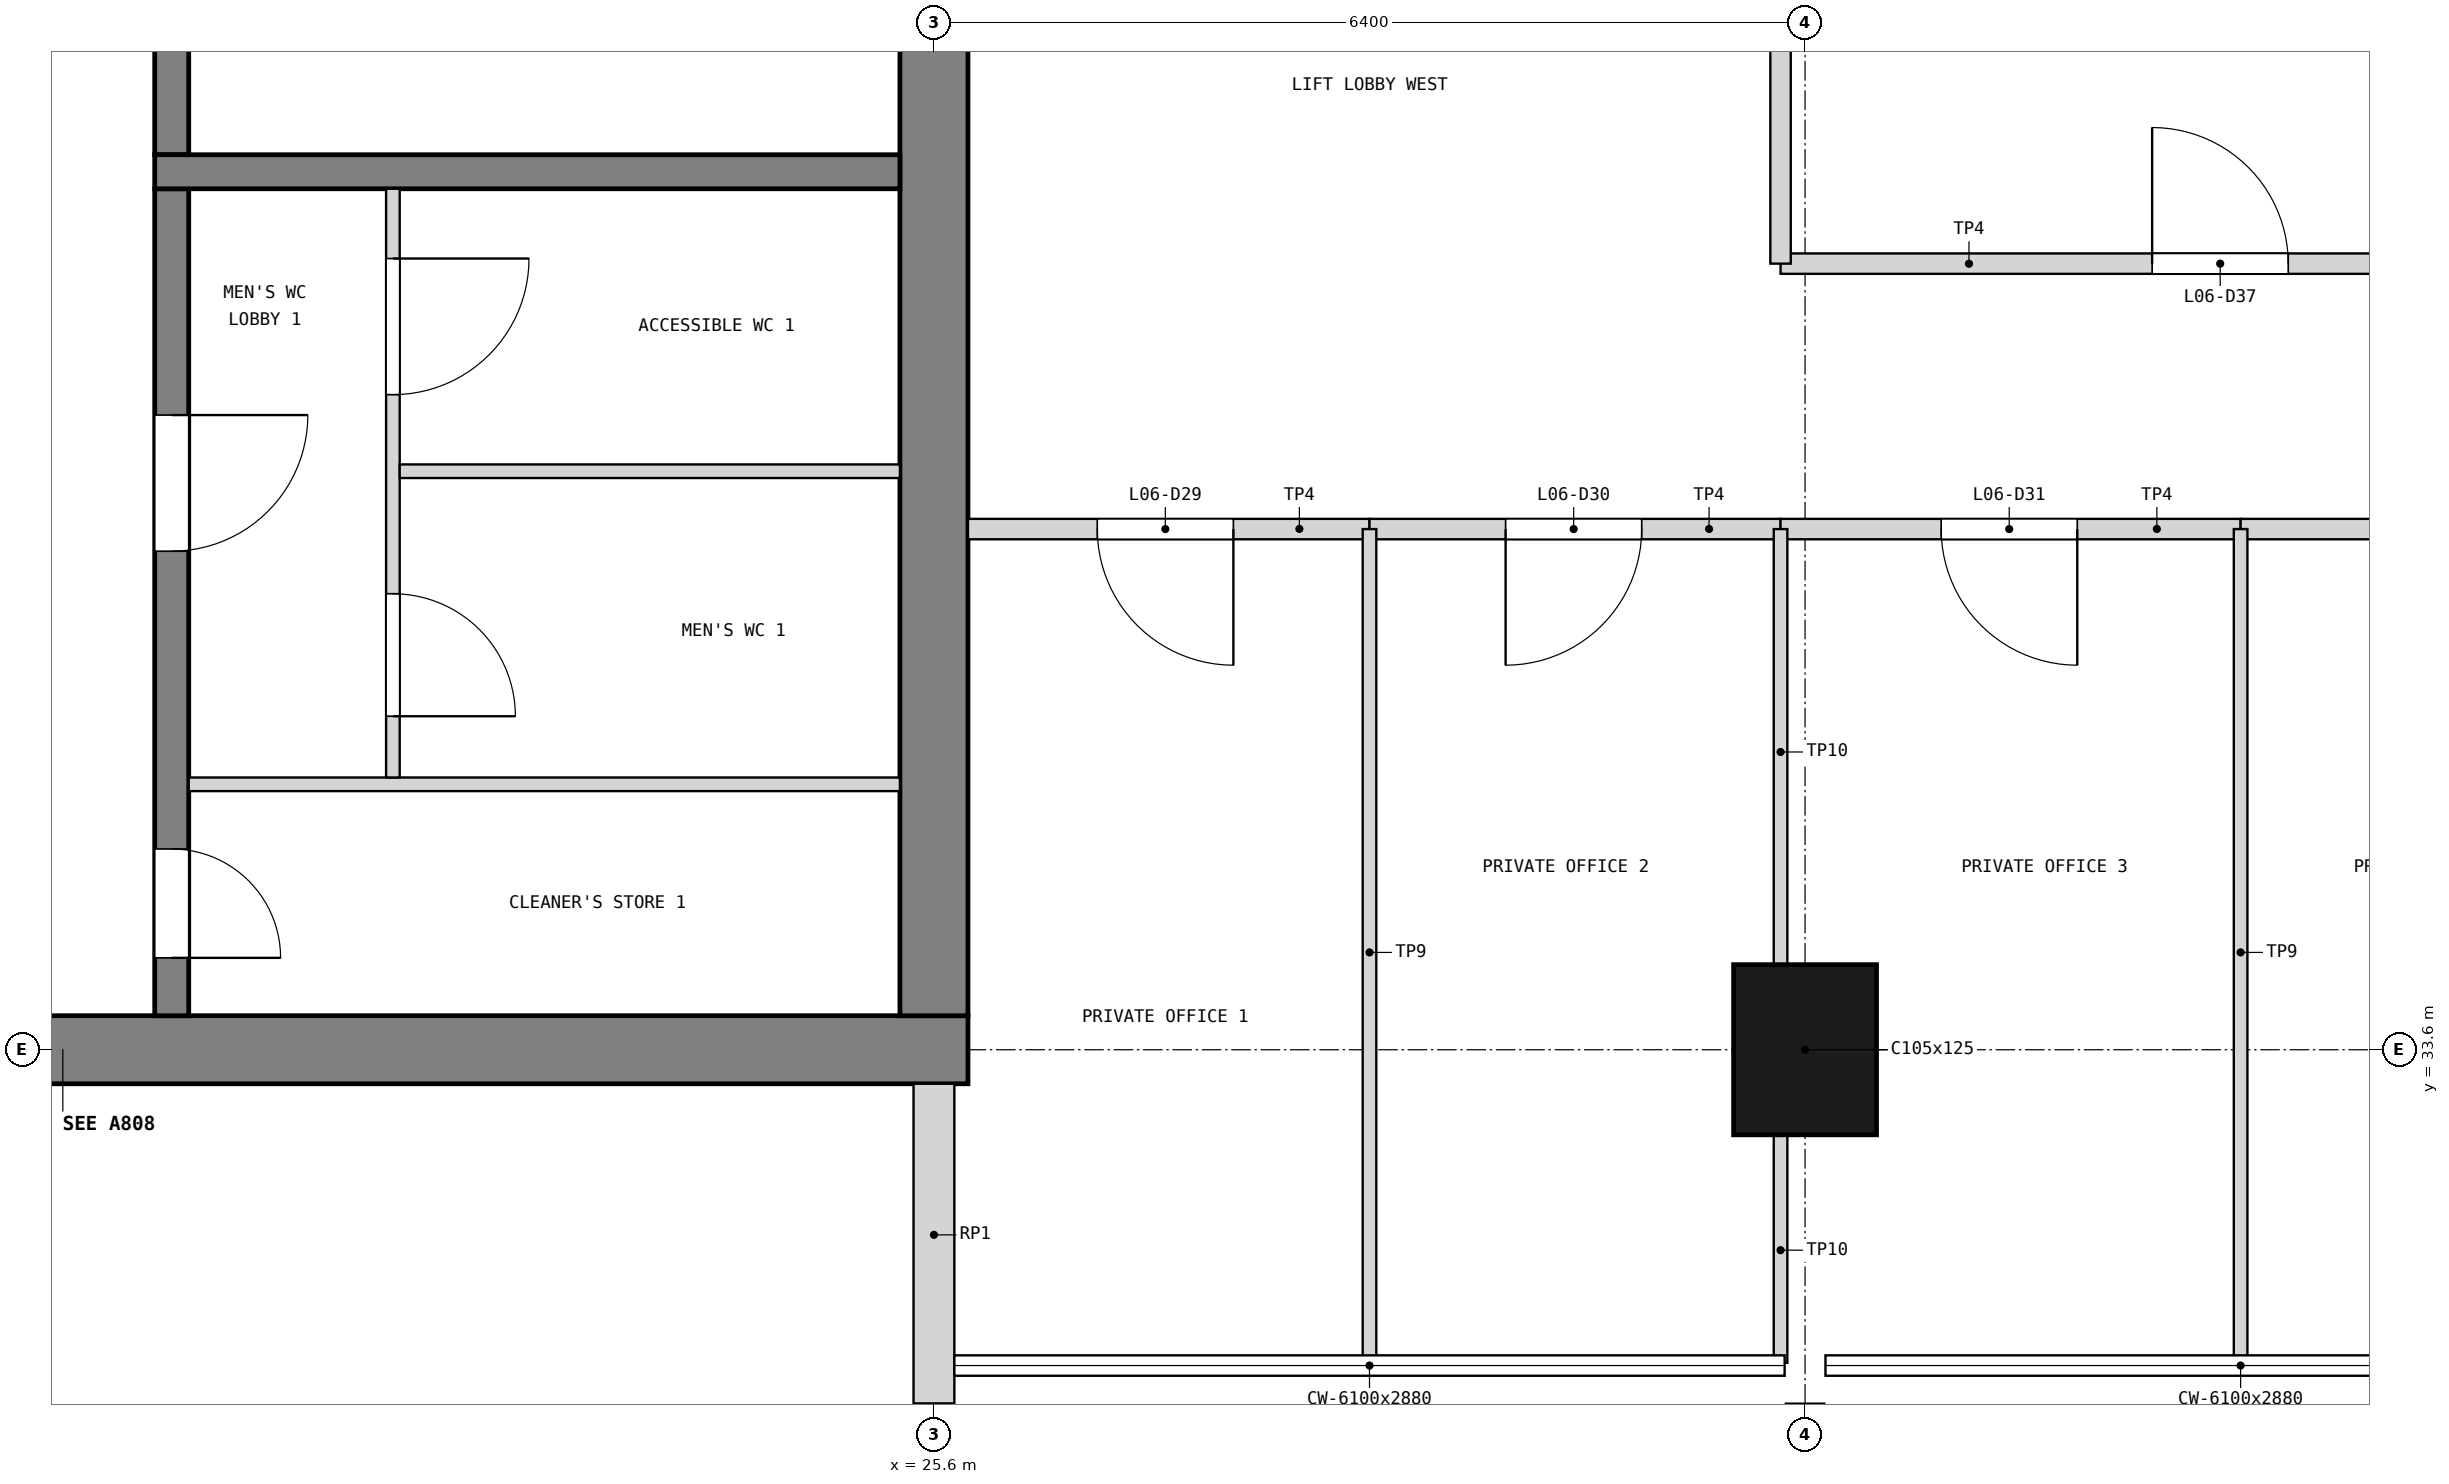
"""IFC4 building model, lengths in metres.
Left out: names, types, materials, properties, quantities, classifications, styles, units other than length and angle.
Written with IfcOpenShell. Run it as: python <this file> out.ifc"""

import sys

from ifc_helpers import new_model, si_unit, direction, frame, frame_2d, origin, origin_2d, place, context, subcontext, project, spatial, rectangle, extrude, element, fill, save


model = new_model("IFC4")
c1 = context("Model", 3, precision=1e-05, world=origin(), true_north=direction((0.0, 1.0)))
c2 = subcontext(c1, "Body", "Model", "MODEL_VIEW")
j1 = project(units=[si_unit("LENGTHUNIT", "METRE"), si_unit("PLANEANGLEUNIT", "RADIAN")], contexts=[c1])
p1 = place(None, origin())
s1 = spatial("IfcSite", under=j1, at=p1, CompositionType="ELEMENT")
p2 = place(p1, origin())
s2 = spatial("IfcBuilding", under=s1, at=p2, CompositionType="ELEMENT")
p3 = place(p2, frame((0.0, 0.0, 24.9)))
s3 = spatial("IfcBuildingStorey", under=s2, at=p3, CompositionType="ELEMENT", Elevation=24.9)
p4 = place(p3, frame((12.55, 33.6, 0.0), z_axis=(0.0, 0.0, 1.0), x_axis=(1.0, 0.0, 0.0)))
e1 = element("IfcWall", 1, at=p4, inside=s3, PredefinedType="SHEAR", context=c2, shape_type="SweptSolid", body=[
    extrude(rectangle(XDim=13.3, YDim=0.5, at=frame_2d((6.65, 0.0))), origin(), (0.0, 0.0, 1.0), 3.9),
])
p5 = place(p4, frame((1.85, 0.0, 1.0)))
e2 = element("IfcOpeningElement", 2, at=p5, cuts=e1, PredefinedType="OPENING", context=c2, shape_type="SweptSolid", body=[
    extrude(rectangle(XDim=0.4, YDim=2.0, at=frame_2d((0.2, 1.0))), frame((0.0, 0.26, 0.0), z_axis=(0.0, -1.0, 0.0), x_axis=(1.0, 0.0, 0.0)), (0.0, 0.0, 1.0), 0.52),
])
p6 = place(p3, frame((25.6, 33.85, 0.0), z_axis=(0.0, 0.0, 1.0), x_axis=(0.0, 1.0, 0.0)))
e3 = element("IfcWall", 3, at=p6, inside=s3, PredefinedType="SHEAR", context=c2, shape_type="SweptSolid", body=[
    extrude(rectangle(XDim=18.7, YDim=0.5, at=frame_2d((9.35, 0.0))), origin(), (0.0, 0.0, 1.0), 3.9),
])
p7 = place(p6, frame((8.35, 0.0, 0.0)))
e4 = element("IfcOpeningElement", 4, at=p7, cuts=e3, PredefinedType="OPENING", context=c2, shape_type="SweptSolid", body=[
    extrude(rectangle(XDim=2.0, YDim=2.1, at=frame_2d((1.0, 1.05))), frame((0.0, 0.26, 0.0), z_axis=(0.0, -1.0, 0.0), x_axis=(1.0, 0.0, 0.0)), (0.0, 0.0, 1.0), 0.52),
])
p8 = place(p3, frame((32.0, 33.6, 0.0), z_axis=(0.0, 0.0, 1.0), x_axis=(1.0, 0.0, 0.0)))
e5 = element("IfcColumn", 5, at=p8, inside=s3, PredefinedType="COLUMN", context=c2, shape_type="SweptSolid", body=[
    extrude(rectangle(XDim=1.05, YDim=1.25, at=origin_2d()), origin(), (0.0, 0.0, 1.0), 3.9),
])
p9 = place(p3, frame((25.6, 31.0, 0.0), z_axis=(0.0, 0.0, 1.0), x_axis=(0.0, 1.0, 0.0)))
e6 = element("IfcWall", 6, at=p9, inside=s3, PredefinedType="SOLIDWALL", context=c2, shape_type="SweptSolid", body=[
    extrude(rectangle(XDim=2.35, YDim=0.3, at=frame_2d((1.175, 0.0))), origin(), (0.0, 0.0, 1.0), 2.88),
])
p10 = place(p3, frame((20.0, 33.85, 0.0), z_axis=(0.0, 0.0, 1.0), x_axis=(0.0, 1.0, 0.0)))
e7 = element("IfcWall", 7, at=p10, inside=s3, PredefinedType="SOLIDWALL", context=c2, shape_type="SweptSolid", body=[
    extrude(rectangle(XDim=6.075, YDim=0.25, at=frame_2d((3.038, 0.0))), origin(), (0.0, 0.0, 1.0), 3.6),
])
p11 = place(p10, frame((0.425, 0.0, 0.0)))
e8 = element("IfcOpeningElement", 8, at=p11, cuts=e7, PredefinedType="OPENING", context=c2, shape_type="SweptSolid", body=[
    extrude(rectangle(XDim=0.8, YDim=2.1, at=frame_2d((0.4, 1.05))), frame((0.0, 0.135, 0.0), z_axis=(0.0, -1.0, 0.0), x_axis=(1.0, 0.0, 0.0)), (0.0, 0.0, 1.0), 0.27),
])
p12 = place(p10, frame((3.413, 0.0, 0.0)))
e9 = element("IfcOpeningElement", 9, at=p12, cuts=e7, PredefinedType="OPENING", context=c2, shape_type="SweptSolid", body=[
    extrude(rectangle(XDim=1.0, YDim=2.1, at=frame_2d((0.5, 1.05))), frame((0.0, 0.135, 0.0), z_axis=(0.0, -1.0, 0.0), x_axis=(1.0, 0.0, 0.0)), (0.0, 0.0, 1.0), 0.27),
])
p13 = place(p3, frame((20.0, 40.175, 0.0), z_axis=(0.0, 0.0, 1.0), x_axis=(0.0, 1.0, 0.0)))
e10 = element("IfcWall", 10, at=p13, inside=s3, PredefinedType="SOLIDWALL", context=c2, shape_type="SweptSolid", body=[
    extrude(rectangle(XDim=6.05, YDim=0.25, at=frame_2d((3.025, 0.0))), origin(), (0.0, 0.0, 1.0), 3.6),
])
p14 = place(p13, frame((2.025, 0.0, 0.0)))
e11 = element("IfcOpeningElement", 11, at=p14, cuts=e10, PredefinedType="OPENING", context=c2, shape_type="SweptSolid", body=[
    extrude(rectangle(XDim=2.0, YDim=2.1, at=frame_2d((1.0, 1.05))), frame((0.0, 0.135, 0.0), z_axis=(0.0, -1.0, 0.0), x_axis=(1.0, 0.0, 0.0)), (0.0, 0.0, 1.0), 0.27),
])
p15 = place(p3, frame((19.875, 40.05, 0.0), z_axis=(0.0, 0.0, 1.0), x_axis=(1.0, 0.0, 0.0)))
e12 = element("IfcWall", 12, at=p15, inside=s3, PredefinedType="SOLIDWALL", context=c2, shape_type="SweptSolid", body=[
    extrude(rectangle(XDim=5.475, YDim=0.25, at=frame_2d((2.738, 0.0))), origin(), (0.0, 0.0, 1.0), 3.6),
])
p16 = place(p3, frame((20.125, 35.55, 0.0), z_axis=(0.0, 0.0, 1.0), x_axis=(1.0, 0.0, 0.0)))
e13 = element("IfcWall", 13, at=p16, inside=s3, PredefinedType="PARTITIONING", context=c2, shape_type="SweptSolid", body=[
    extrude(rectangle(XDim=5.225, YDim=0.1, at=frame_2d((2.613, 0.0))), origin(), (0.0, 0.0, 1.0), 3.6),
])
p17 = place(p3, frame((21.625, 35.6, 0.0), z_axis=(0.0, 0.0, 1.0), x_axis=(0.0, 1.0, 0.0)))
e14 = element("IfcWall", 14, at=p17, inside=s3, PredefinedType="PARTITIONING", context=c2, shape_type="SweptSolid", body=[
    extrude(rectangle(XDim=4.325, YDim=0.1, at=frame_2d((2.163, 0.0))), origin(), (0.0, 0.0, 1.0), 3.6),
])
p18 = place(p17, frame((0.45, 0.0, 0.0)))
e15 = element("IfcOpeningElement", 15, at=p18, cuts=e14, PredefinedType="OPENING", context=c2, shape_type="SweptSolid", body=[
    extrude(rectangle(XDim=0.9, YDim=2.1, at=frame_2d((0.45, 1.05))), frame((0.0, 0.06, 0.0), z_axis=(0.0, -1.0, 0.0), x_axis=(1.0, 0.0, 0.0)), (0.0, 0.0, 1.0), 0.12),
])
p19 = place(p17, frame((2.812, 0.0, 0.0)))
e16 = element("IfcOpeningElement", 16, at=p19, cuts=e14, PredefinedType="OPENING", context=c2, shape_type="SweptSolid", body=[
    extrude(rectangle(XDim=1.0, YDim=2.1, at=frame_2d((0.5, 1.05))), frame((0.0, 0.06, 0.0), z_axis=(0.0, -1.0, 0.0), x_axis=(1.0, 0.0, 0.0)), (0.0, 0.0, 1.0), 0.12),
])
p20 = place(p3, frame((21.675, 37.85, 0.0), z_axis=(0.0, 0.0, 1.0), x_axis=(1.0, 0.0, 0.0)))
e17 = element("IfcWall", 17, at=p20, inside=s3, PredefinedType="PARTITIONING", context=c2, shape_type="SweptSolid", body=[
    extrude(rectangle(XDim=3.675, YDim=0.1, at=frame_2d((1.837, 0.0))), origin(), (0.0, 0.0, 1.0), 3.6),
])
p21 = place(p3, frame((25.85, 37.425, 0.0), z_axis=(0.0, 0.0, 1.0), x_axis=(1.0, 0.0, 0.0)))
e18 = element("IfcWall", 18, at=p21, inside=s3, PredefinedType="PARTITIONING", context=c2, shape_type="SweptSolid", body=[
    extrude(rectangle(XDim=2.95, YDim=0.15, at=frame_2d((1.475, 0.0))), origin(), (0.0, 0.0, 1.0), 3.68),
])
p22 = place(p21, frame((0.95, 0.0, 0.0)))
e19 = element("IfcOpeningElement", 19, at=p22, cuts=e18, PredefinedType="OPENING", context=c2, shape_type="SweptSolid", body=[
    extrude(rectangle(XDim=1.0, YDim=2.1, at=frame_2d((0.5, 1.05))), frame((0.0, 0.085, 0.0), z_axis=(0.0, -1.0, 0.0), x_axis=(1.0, 0.0, 0.0)), (0.0, 0.0, 1.0), 0.17),
])
p23 = place(p3, frame((28.8, 37.425, 0.0), z_axis=(0.0, 0.0, 1.0), x_axis=(1.0, 0.0, 0.0)))
e20 = element("IfcWall", 20, at=p23, inside=s3, PredefinedType="PARTITIONING", context=c2, shape_type="SweptSolid", body=[
    extrude(rectangle(XDim=3.02, YDim=0.15, at=frame_2d((1.51, 0.0))), origin(), (0.0, 0.0, 1.0), 3.68),
])
p24 = place(p23, frame((1.0, 0.0, 0.0)))
e21 = element("IfcOpeningElement", 21, at=p24, cuts=e20, PredefinedType="OPENING", context=c2, shape_type="SweptSolid", body=[
    extrude(rectangle(XDim=1.0, YDim=2.1, at=frame_2d((0.5, 1.05))), frame((0.0, 0.085, 0.0), z_axis=(0.0, -1.0, 0.0), x_axis=(1.0, 0.0, 0.0)), (0.0, 0.0, 1.0), 0.17),
])
p25 = place(p3, frame((31.82, 37.425, 0.0), z_axis=(0.0, 0.0, 1.0), x_axis=(1.0, 0.0, 0.0)))
e22 = element("IfcWall", 22, at=p25, inside=s3, PredefinedType="PARTITIONING", context=c2, shape_type="SweptSolid", body=[
    extrude(rectangle(XDim=3.38, YDim=0.15, at=frame_2d((1.69, 0.0))), origin(), (0.0, 0.0, 1.0), 3.68),
])
p26 = place(p25, frame((1.18, 0.0, 0.0)))
e23 = element("IfcOpeningElement", 23, at=p26, cuts=e22, PredefinedType="OPENING", context=c2, shape_type="SweptSolid", body=[
    extrude(rectangle(XDim=1.0, YDim=2.1, at=frame_2d((0.5, 1.05))), frame((0.0, 0.085, 0.0), z_axis=(0.0, -1.0, 0.0), x_axis=(1.0, 0.0, 0.0)), (0.0, 0.0, 1.0), 0.17),
])
p27 = place(p3, frame((35.2, 37.425, 0.0), z_axis=(0.0, 0.0, 1.0), x_axis=(1.0, 0.0, 0.0)))
e24 = element("IfcWall", 24, at=p27, inside=s3, PredefinedType="PARTITIONING", context=c2, shape_type="SweptSolid", body=[
    extrude(rectangle(XDim=3.02, YDim=0.15, at=frame_2d((1.51, 0.0))), origin(), (0.0, 0.0, 1.0), 3.68),
])
p28 = place(p27, frame((1.0, 0.0, 0.0)))
e25 = element("IfcOpeningElement", 25, at=p28, cuts=e24, PredefinedType="OPENING", context=c2, shape_type="SweptSolid", body=[
    extrude(rectangle(XDim=1.0, YDim=2.1, at=frame_2d((0.5, 1.05))), frame((0.0, 0.085, 0.0), z_axis=(0.0, -1.0, 0.0), x_axis=(1.0, 0.0, 0.0)), (0.0, 0.0, 1.0), 0.17),
])
p29 = place(p3, frame((28.8, 31.3, 0.0), z_axis=(0.0, 0.0, 1.0), x_axis=(0.0, 1.0, 0.0)))
e26 = element("IfcWall", 26, at=p29, inside=s3, PredefinedType="PARTITIONING", context=c2, shape_type="SweptSolid", body=[
    extrude(rectangle(XDim=6.125, YDim=0.1, at=frame_2d((3.062, 0.0))), origin(), (0.0, 0.0, 1.0), 3.08),
])
p30 = place(p3, frame((31.82, 31.3, 0.0), z_axis=(0.0, 0.0, 1.0), x_axis=(0.0, 1.0, 0.0)))
e27 = element("IfcWall", 27, at=p30, inside=s3, PredefinedType="PARTITIONING", context=c2, shape_type="SweptSolid", body=[
    extrude(rectangle(XDim=1.695, YDim=0.1, at=frame_2d((0.848, 0.0))), origin(), (0.0, 0.0, 1.0), 2.78),
])
p31 = place(p3, frame((31.82, 34.205, 0.0), z_axis=(0.0, 0.0, 1.0), x_axis=(0.0, 1.0, 0.0)))
e28 = element("IfcWall", 28, at=p31, inside=s3, PredefinedType="PARTITIONING", context=c2, shape_type="SweptSolid", body=[
    extrude(rectangle(XDim=3.22, YDim=0.1, at=frame_2d((1.61, 0.0))), origin(), (0.0, 0.0, 1.0), 2.78),
])
p32 = place(p3, frame((35.2, 31.3, 0.0), z_axis=(0.0, 0.0, 1.0), x_axis=(0.0, 1.0, 0.0)))
e29 = element("IfcWall", 29, at=p32, inside=s3, PredefinedType="PARTITIONING", context=c2, shape_type="SweptSolid", body=[
    extrude(rectangle(XDim=6.125, YDim=0.1, at=frame_2d((3.062, 0.0))), origin(), (0.0, 0.0, 1.0), 3.08),
])
p33 = place(p3, frame((31.82, 39.375, 0.0), z_axis=(0.0, 0.0, 1.0), x_axis=(1.0, 0.0, 0.0)))
e30 = element("IfcWall", 30, at=p33, inside=s3, PredefinedType="PARTITIONING", context=c2, shape_type="SweptSolid", body=[
    extrude(rectangle(XDim=6.4, YDim=0.15, at=frame_2d((3.2, 0.0))), origin(), (0.0, 0.0, 1.0), 3.68),
])
p34 = place(p33, frame((2.73, 0.0, 0.0)))
e31 = element("IfcOpeningElement", 31, at=p34, cuts=e30, PredefinedType="OPENING", context=c2, shape_type="SweptSolid", body=[
    extrude(rectangle(XDim=1.0, YDim=2.1, at=frame_2d((0.5, 1.05))), frame((0.0, 0.085, 0.0), z_axis=(0.0, -1.0, 0.0), x_axis=(1.0, 0.0, 0.0)), (0.0, 0.0, 1.0), 0.17),
])
p35 = place(p3, frame((31.82, 39.375, 0.0), z_axis=(0.0, 0.0, 1.0), x_axis=(0.0, 1.0, 0.0)))
e32 = element("IfcWall", 32, at=p35, inside=s3, PredefinedType="PARTITIONING", context=c2, shape_type="SweptSolid", body=[
    extrude(rectangle(XDim=3.352, YDim=0.15, at=frame_2d((1.676, 0.0))), origin(), (0.0, 0.0, 1.0), 2.78),
])
p36 = place(p11, frame((0.8, 0.0, 0.0), z_axis=(0.0, 0.0, 1.0), x_axis=(-1.0, 0.0, 0.0)))
e33 = element("IfcDoor", 33, at=p36, inside=s3, OperationType="SINGLE_SWING_RIGHT", PredefinedType="DOOR", context=c2, shape_type="SweptSolid", body=[
    extrude(rectangle(XDim=0.8, YDim=2.1, at=frame_2d((0.4, 1.05))), frame((0.0, 0.025, 0.0), z_axis=(0.0, -1.0, 0.0), x_axis=(1.0, 0.0, 0.0)), (0.0, 0.0, 1.0), 0.05),
])
fill(e8, e33)
p37 = place(p12, frame((1.0, 0.0, 0.0), z_axis=(0.0, 0.0, 1.0), x_axis=(-1.0, 0.0, 0.0)))
e34 = element("IfcDoor", 34, at=p37, inside=s3, OperationType="SINGLE_SWING_LEFT", PredefinedType="DOOR", context=c2, shape_type="SweptSolid", body=[
    extrude(rectangle(XDim=1.0, YDim=2.1, at=frame_2d((0.5, 1.05))), frame((0.0, 0.025, 0.0), z_axis=(0.0, -1.0, 0.0), x_axis=(1.0, 0.0, 0.0)), (0.0, 0.0, 1.0), 0.05),
])
fill(e9, e34)
p38 = place(p18, frame((0.9, 0.0, 0.0), z_axis=(0.0, 0.0, 1.0), x_axis=(-1.0, 0.0, 0.0)))
e35 = element("IfcDoor", 35, at=p38, inside=s3, OperationType="SINGLE_SWING_RIGHT", PredefinedType="DOOR", context=c2, shape_type="SweptSolid", body=[
    extrude(rectangle(XDim=0.9, YDim=2.1, at=frame_2d((0.45, 1.05))), frame((0.0, 0.025, 0.0), z_axis=(0.0, -1.0, 0.0), x_axis=(1.0, 0.0, 0.0)), (0.0, 0.0, 1.0), 0.05),
])
fill(e15, e35)
p39 = place(p19, frame((1.0, 0.0, 0.0), z_axis=(0.0, 0.0, 1.0), x_axis=(-1.0, 0.0, 0.0)))
e36 = element("IfcDoor", 36, at=p39, inside=s3, OperationType="SINGLE_SWING_LEFT", PredefinedType="DOOR", context=c2, shape_type="SweptSolid", body=[
    extrude(rectangle(XDim=1.0, YDim=2.1, at=frame_2d((0.5, 1.05))), frame((0.0, 0.025, 0.0), z_axis=(0.0, -1.0, 0.0), x_axis=(1.0, 0.0, 0.0)), (0.0, 0.0, 1.0), 0.05),
])
fill(e16, e36)
p40 = place(p22, frame((1.0, 0.0, 0.0), z_axis=(0.0, 0.0, 1.0), x_axis=(-1.0, 0.0, 0.0)))
e37 = element("IfcDoor", 37, at=p40, inside=s3, OperationType="SINGLE_SWING_LEFT", PredefinedType="DOOR", context=c2, shape_type="SweptSolid", body=[
    extrude(rectangle(XDim=1.0, YDim=2.1, at=frame_2d((0.5, 1.05))), frame((0.0, 0.025, 0.0), z_axis=(0.0, -1.0, 0.0), x_axis=(1.0, 0.0, 0.0)), (0.0, 0.0, 1.0), 0.05),
])
fill(e19, e37)
p41 = place(p24, frame((1.0, 0.0, 0.0), z_axis=(0.0, 0.0, 1.0), x_axis=(-1.0, 0.0, 0.0)))
e38 = element("IfcDoor", 38, at=p41, inside=s3, OperationType="SINGLE_SWING_RIGHT", PredefinedType="DOOR", context=c2, shape_type="SweptSolid", body=[
    extrude(rectangle(XDim=1.0, YDim=2.1, at=frame_2d((0.5, 1.05))), frame((0.0, 0.025, 0.0), z_axis=(0.0, -1.0, 0.0), x_axis=(1.0, 0.0, 0.0)), (0.0, 0.0, 1.0), 0.05),
])
fill(e21, e38)
p42 = place(p26, frame((1.0, 0.0, 0.0), z_axis=(0.0, 0.0, 1.0), x_axis=(-1.0, 0.0, 0.0)))
e39 = element("IfcDoor", 39, at=p42, inside=s3, OperationType="SINGLE_SWING_LEFT", PredefinedType="DOOR", context=c2, shape_type="SweptSolid", body=[
    extrude(rectangle(XDim=1.0, YDim=2.1, at=frame_2d((0.5, 1.05))), frame((0.0, 0.025, 0.0), z_axis=(0.0, -1.0, 0.0), x_axis=(1.0, 0.0, 0.0)), (0.0, 0.0, 1.0), 0.05),
])
fill(e23, e39)
p43 = place(p34, origin())
e40 = element("IfcDoor", 40, at=p43, inside=s3, OperationType="SINGLE_SWING_LEFT", PredefinedType="DOOR", context=c2, shape_type="SweptSolid", body=[
    extrude(rectangle(XDim=1.0, YDim=2.1, at=frame_2d((0.5, 1.05))), frame((0.0, 0.025, 0.0), z_axis=(0.0, -1.0, 0.0), x_axis=(1.0, 0.0, 0.0)), (0.0, 0.0, 1.0), 0.05),
])
fill(e31, e40)
save(model, sys.argv[1])
